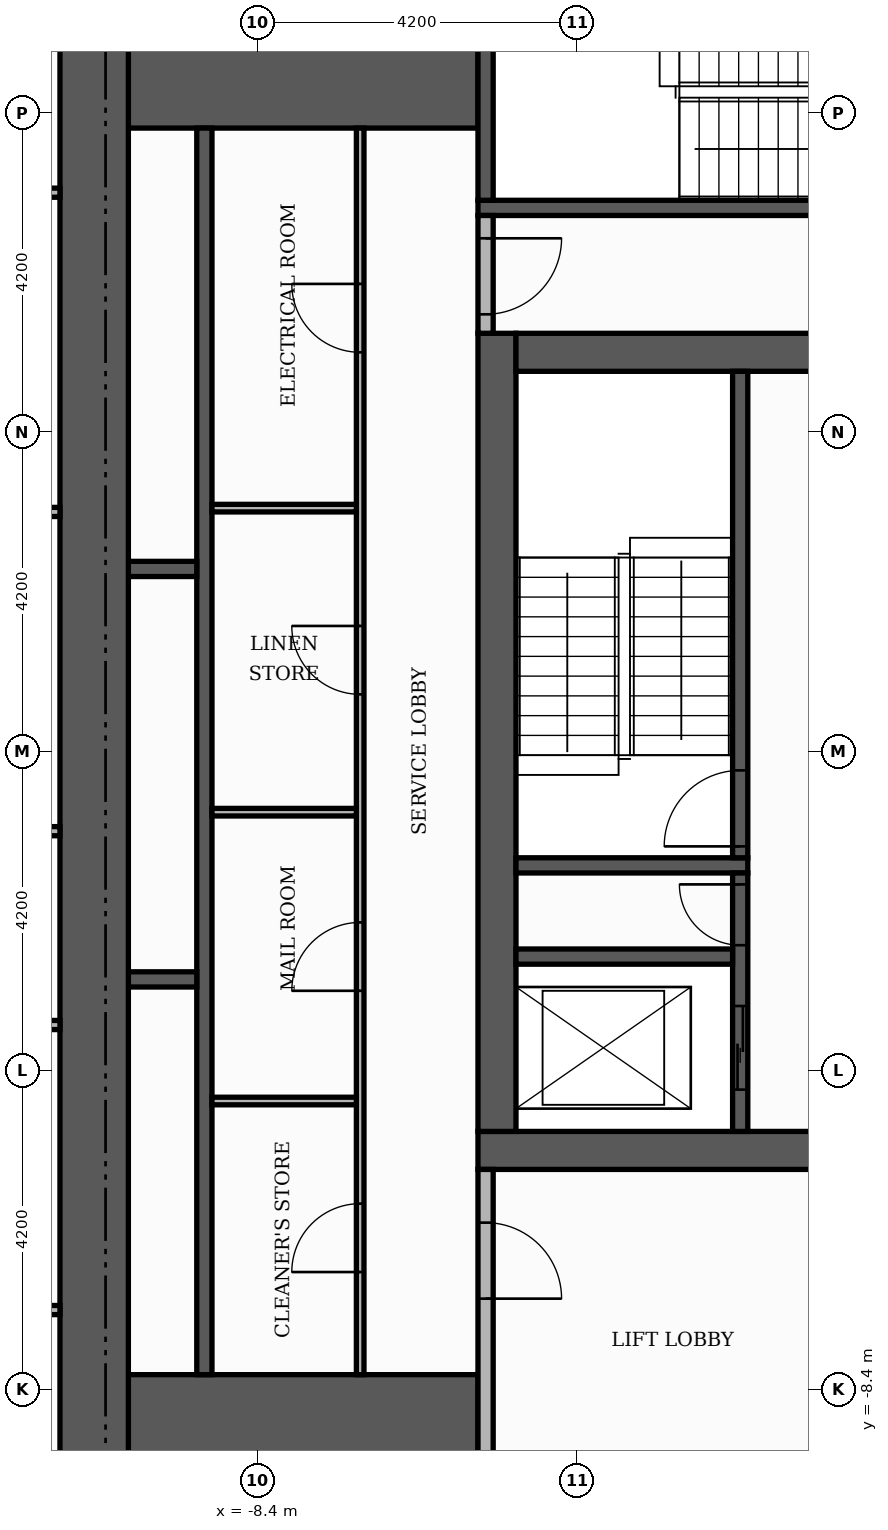
"""IFC4 building model, lengths in metres.
Left out: names, types, materials, properties, quantities, classifications, styles, units other than length and angle.
Written with IfcOpenShell. Run it as: python <this file> out.ifc"""

import sys

from ifc_helpers import new_model, si_unit, direction, frame, frame_2d, origin, place, context, subcontext, project, spatial, rectangle, extrude, element, fill, save


model = new_model("IFC4")
c1 = context("Model", 3, precision=1e-05, world=origin(), true_north=direction((0.0, 1.0)))
c2 = subcontext(c1, "Body", "Model", "MODEL_VIEW")
j1 = project(units=[si_unit("LENGTHUNIT", "METRE"), si_unit("PLANEANGLEUNIT", "RADIAN")], contexts=[c1])
p1 = place(None, origin())
s1 = spatial("IfcSite", under=j1, at=p1, CompositionType="ELEMENT")
p2 = place(p1, origin())
s2 = spatial("IfcBuilding", under=s1, at=p2, CompositionType="ELEMENT")
p3 = place(p2, frame((0.0, 0.0, 252.3)))
s3 = spatial("IfcBuildingStorey", under=s2, at=p3, CompositionType="ELEMENT", Elevation=252.3)
p4 = place(p3, frame((-5.5, -5.25, 0.0), z_axis=(0.0, 0.0, 1.0), x_axis=(1.0, 0.0, 0.0)))
e1 = element("IfcWall", 1, at=p4, inside=s3, PredefinedType="SHEAR", context=c2, shape_type="SweptSolid", body=[
    extrude(rectangle(XDim=11.0, YDim=0.5, at=frame_2d((5.5, 0.0))), origin(), (0.0, 0.0, 1.0), 3.48),
])
p5 = place(p4, frame((4.9, 0.0, 0.0)))
e2 = element("IfcOpeningElement", 2, at=p5, cuts=e1, PredefinedType="OPENING", context=c2, shape_type="SweptSolid", body=[
    extrude(rectangle(XDim=1.2, YDim=2.1, at=frame_2d((0.6, 1.05))), frame((0.0, 0.26, 0.0), z_axis=(0.0, -1.0, 0.0), x_axis=(1.0, 0.0, 0.0)), (0.0, 0.0, 1.0), 0.52),
])
p6 = place(p3, frame((-5.25, -5.0, 0.0), z_axis=(0.0, 0.0, 1.0), x_axis=(0.0, 1.0, 0.0)))
e3 = element("IfcWall", 3, at=p6, inside=s3, PredefinedType="SHEAR", context=c2, shape_type="SweptSolid", body=[
    extrude(rectangle(XDim=10.5, YDim=0.5, at=frame_2d((5.25, 0.0))), origin(), (0.0, 0.0, 1.0), 3.48),
])
p7 = place(p3, frame((-5.0, 5.25, 0.0), z_axis=(0.0, 0.0, 1.0), x_axis=(1.0, 0.0, 0.0)))
e4 = element("IfcWall", 4, at=p7, inside=s3, PredefinedType="SHEAR", context=c2, shape_type="SweptSolid", body=[
    extrude(rectangle(XDim=10.0, YDim=0.5, at=frame_2d((5.0, 0.0))), origin(), (0.0, 0.0, 1.0), 3.48),
])
p8 = place(p7, frame((4.4, 0.0, 0.0)))
e5 = element("IfcOpeningElement", 5, at=p8, cuts=e4, PredefinedType="OPENING", context=c2, shape_type="SweptSolid", body=[
    extrude(rectangle(XDim=1.2, YDim=2.1, at=frame_2d((0.6, 1.05))), frame((0.0, 0.26, 0.0), z_axis=(0.0, -1.0, 0.0), x_axis=(1.0, 0.0, 0.0)), (0.0, 0.0, 1.0), 0.52),
])
for number, where, z_axis, x_axis in (
    (6, (-10.1, -9.15, 0.0), (0.0, 0.0, 1.0), (1.0, 0.0, 0.0)),
    (7, (-10.1, 9.15, 0.0), (0.0, 0.0, 1.0), (1.0, 0.0, 0.0)),
):
    element("IfcWall", number, at=place(p3, frame(where, z_axis=z_axis, x_axis=x_axis)), inside=s3, PredefinedType="SHEAR", context=c2, shape_type="SweptSolid", body=[
        extrude(rectangle(XDim=4.6, YDim=1.9, at=frame_2d((2.3, 0.0))), origin(), (0.0, 0.0, 1.0), 3.48),
    ])
p9 = place(p3, frame((-5.0, -1.5, 0.0), z_axis=(0.0, 0.0, 1.0), x_axis=(1.0, 0.0, 0.0)))
e8 = element("IfcWall", 8, at=p9, inside=s3, PredefinedType="SHEAR", context=c2, shape_type="SweptSolid", body=[
    extrude(rectangle(XDim=3.05, YDim=0.2, at=frame_2d((1.525, 0.0))), origin(), (0.0, 0.0, 1.0), 3.48),
])
p10 = place(p3, frame((-2.05, -1.4, 0.0), z_axis=(0.0, 0.0, 1.0), x_axis=(0.0, 1.0, 0.0)))
e9 = element("IfcWall", 9, at=p10, inside=s3, PredefinedType="SHEAR", context=c2, shape_type="SweptSolid", body=[
    extrude(rectangle(XDim=6.4, YDim=0.2, at=frame_2d((3.2, 0.0))), origin(), (0.0, 0.0, 1.0), 3.48),
])
p11 = place(p10, frame((0.15, 0.0, 0.0)))
e10 = element("IfcOpeningElement", 10, at=p11, cuts=e9, PredefinedType="OPENING", context=c2, shape_type="SweptSolid", body=[
    extrude(rectangle(XDim=1.0, YDim=2.1, at=frame_2d((0.5, 1.05))), frame((0.0, 0.11, 0.0), z_axis=(0.0, -1.0, 0.0), x_axis=(1.0, 0.0, 0.0)), (0.0, 0.0, 1.0), 0.22),
])
p12 = place(p3, frame((-5.5, 7.15, 0.0), z_axis=(0.0, 0.0, 1.0), x_axis=(1.0, 0.0, 0.0)))
e11 = element("IfcWall", 11, at=p12, inside=s3, PredefinedType="SHEAR", context=c2, shape_type="SweptSolid", body=[
    extrude(rectangle(XDim=6.8, YDim=0.2, at=frame_2d((3.4, 0.0))), origin(), (0.0, 0.0, 1.0), 3.48),
])
p13 = place(p3, frame((-5.4, 7.25, 0.0), z_axis=(0.0, 0.0, 1.0), x_axis=(0.0, 1.0, 0.0)))
e12 = element("IfcWall", 12, at=p13, inside=s3, PredefinedType="SHEAR", context=c2, shape_type="SweptSolid", body=[
    extrude(rectangle(XDim=2.85, YDim=0.2, at=frame_2d((1.425, 0.0))), origin(), (0.0, 0.0, 1.0), 3.48),
])
p14 = place(p3, frame((-9.1, -8.2, 0.0), z_axis=(0.0, 0.0, 1.0), x_axis=(0.0, 1.0, 0.0)))
e13 = element("IfcWall", 13, at=p14, inside=s3, PredefinedType="SHEAR", context=c2, shape_type="SweptSolid", body=[
    extrude(rectangle(XDim=16.4, YDim=0.2, at=frame_2d((8.2, 0.0))), origin(), (0.0, 0.0, 1.0), 3.48),
])
p15 = place(p3, frame((-2.05, -5.0, 0.0), z_axis=(0.0, 0.0, 1.0), x_axis=(0.0, 1.0, 0.0)))
e14 = element("IfcWall", 14, at=p15, inside=s3, PredefinedType="SHEAR", context=c2, shape_type="SweptSolid", body=[
    extrude(rectangle(XDim=3.4, YDim=0.2, at=frame_2d((1.7, 0.0))), origin(), (0.0, 0.0, 1.0), 3.48),
])
p16 = place(p15, frame((0.55, 0.0, 0.0)))
e15 = element("IfcOpeningElement", 15, at=p16, cuts=e14, PredefinedType="OPENING", context=c2, shape_type="SweptSolid", body=[
    extrude(rectangle(XDim=1.1, YDim=2.1, at=frame_2d((0.55, 1.05))), frame((0.0, 0.11, 0.0), z_axis=(0.0, -1.0, 0.0), x_axis=(1.0, 0.0, 0.0)), (0.0, 0.0, 1.0), 0.22),
])
p17 = place(p15, frame((2.45, 0.0, 0.0)))
e16 = element("IfcOpeningElement", 16, at=p17, cuts=e14, PredefinedType="OPENING", context=c2, shape_type="SweptSolid", body=[
    extrude(rectangle(XDim=0.8, YDim=2.1, at=frame_2d((0.4, 1.05))), frame((0.0, 0.11, 0.0), z_axis=(0.0, -1.0, 0.0), x_axis=(1.0, 0.0, 0.0)), (0.0, 0.0, 1.0), 0.22),
])
p18 = place(p3, frame((-10.1, -3.0, 0.0), z_axis=(0.0, 0.0, 1.0), x_axis=(1.0, 0.0, 0.0)))
e17 = element("IfcWall", 17, at=p18, inside=s3, PredefinedType="SHEAR", context=c2, shape_type="SweptSolid", body=[
    extrude(rectangle(XDim=0.9, YDim=0.2, at=frame_2d((0.45, 0.0))), origin(), (0.0, 0.0, 1.0), 3.48),
])
p19 = place(p3, frame((-5.0, -2.7, 0.0), z_axis=(0.0, 0.0, 1.0), x_axis=(1.0, 0.0, 0.0)))
e18 = element("IfcWall", 18, at=p19, inside=s3, PredefinedType="SHEAR", context=c2, shape_type="SweptSolid", body=[
    extrude(rectangle(XDim=2.85, YDim=0.2, at=frame_2d((1.425, 0.0))), origin(), (0.0, 0.0, 1.0), 3.48),
])
p20 = place(p3, frame((-10.1, 2.4, 0.0), z_axis=(0.0, 0.0, 1.0), x_axis=(1.0, 0.0, 0.0)))
e19 = element("IfcWall", 19, at=p20, inside=s3, PredefinedType="SHEAR", context=c2, shape_type="SweptSolid", body=[
    extrude(rectangle(XDim=0.9, YDim=0.2, at=frame_2d((0.45, 0.0))), origin(), (0.0, 0.0, 1.0), 3.48),
])
p21 = place(p3, frame((-10.55, -10.1, 0.0), z_axis=(0.0, 0.0, 1.0), x_axis=(0.0, 1.0, 0.0)))
e20 = element("IfcWall", 20, at=p21, inside=s3, PredefinedType="SHEAR", context=c2, shape_type="SweptSolid", body=[
    extrude(rectangle(XDim=20.2, YDim=0.9, at=frame_2d((10.1, 0.0))), origin(), (0.0, 0.0, 1.0), 3.48),
])
p22 = place(p3, frame((-5.4, -10.1, 0.0), z_axis=(0.0, 0.0, 1.0), x_axis=(0.0, 1.0, 0.0)))
e21 = element("IfcWall", 21, at=p22, inside=s3, PredefinedType="PARTITIONING", context=c2, shape_type="SweptSolid", body=[
    extrude(rectangle(XDim=4.6, YDim=0.2, at=frame_2d((2.3, 0.0))), origin(), (0.0, 0.0, 1.0), 3.48),
])
p23 = place(p22, frame((2.9, 0.0, 0.0)))
e22 = element("IfcOpeningElement", 22, at=p23, cuts=e21, PredefinedType="OPENING", context=c2, shape_type="SweptSolid", body=[
    extrude(rectangle(XDim=1.0, YDim=2.1, at=frame_2d((0.5, 1.05))), frame((0.0, 0.11, 0.0), z_axis=(0.0, -1.0, 0.0), x_axis=(1.0, 0.0, 0.0)), (0.0, 0.0, 1.0), 0.22),
])
p24 = place(p3, frame((-7.05, -8.2, 0.0), z_axis=(0.0, 0.0, 1.0), x_axis=(0.0, 1.0, 0.0)))
e23 = element("IfcWall", 23, at=p24, inside=s3, PredefinedType="PARTITIONING", context=c2, shape_type="SweptSolid", body=[
    extrude(rectangle(XDim=16.4, YDim=0.1, at=frame_2d((8.2, 0.0))), origin(), (0.0, 0.0, 1.0), 3.48),
])
p25 = place(p24, frame((1.35, 0.0, 0.0)))
e24 = element("IfcOpeningElement", 24, at=p25, cuts=e23, PredefinedType="OPENING", context=c2, shape_type="SweptSolid", body=[
    extrude(rectangle(XDim=0.9, YDim=2.1, at=frame_2d((0.45, 1.05))), frame((0.0, 0.06, 0.0), z_axis=(0.0, -1.0, 0.0), x_axis=(1.0, 0.0, 0.0)), (0.0, 0.0, 1.0), 0.12),
])
p26 = place(p24, frame((5.05, 0.0, 0.0)))
e25 = element("IfcOpeningElement", 25, at=p26, cuts=e23, PredefinedType="OPENING", context=c2, shape_type="SweptSolid", body=[
    extrude(rectangle(XDim=0.9, YDim=2.1, at=frame_2d((0.45, 1.05))), frame((0.0, 0.06, 0.0), z_axis=(0.0, -1.0, 0.0), x_axis=(1.0, 0.0, 0.0)), (0.0, 0.0, 1.0), 0.12),
])
p27 = place(p24, frame((8.95, 0.0, 0.0)))
e26 = element("IfcOpeningElement", 26, at=p27, cuts=e23, PredefinedType="OPENING", context=c2, shape_type="SweptSolid", body=[
    extrude(rectangle(XDim=0.9, YDim=2.1, at=frame_2d((0.45, 1.05))), frame((0.0, 0.06, 0.0), z_axis=(0.0, -1.0, 0.0), x_axis=(1.0, 0.0, 0.0)), (0.0, 0.0, 1.0), 0.12),
])
p28 = place(p24, frame((13.45, 0.0, 0.0)))
e27 = element("IfcOpeningElement", 27, at=p28, cuts=e23, PredefinedType="OPENING", context=c2, shape_type="SweptSolid", body=[
    extrude(rectangle(XDim=0.9, YDim=2.1, at=frame_2d((0.45, 1.05))), frame((0.0, 0.06, 0.0), z_axis=(0.0, -1.0, 0.0), x_axis=(1.0, 0.0, 0.0)), (0.0, 0.0, 1.0), 0.12),
])
for number, where, z_axis, x_axis in (
    (28, (-9.0, -4.6, 0.0), (0.0, 0.0, 1.0), (1.0, 0.0, 0.0)),
    (29, (-9.0, -0.8, 0.0), (0.0, 0.0, 1.0), (1.0, 0.0, 0.0)),
    (30, (-9.0, 3.2, 0.0), (0.0, 0.0, 1.0), (1.0, 0.0, 0.0)),
):
    element("IfcWall", number, at=place(p3, frame(where, z_axis=z_axis, x_axis=x_axis)), inside=s3, PredefinedType="PARTITIONING", context=c2, shape_type="SweptSolid", body=[
        extrude(rectangle(XDim=1.9, YDim=0.1, at=frame_2d((0.95, 0.0))), origin(), (0.0, 0.0, 1.0), 3.48),
    ])
p29 = place(p3, frame((-5.4, 5.5, 0.0), z_axis=(0.0, 0.0, 1.0), x_axis=(0.0, 1.0, 0.0)))
e31 = element("IfcWall", 31, at=p29, inside=s3, PredefinedType="PARTITIONING", context=c2, shape_type="SweptSolid", body=[
    extrude(rectangle(XDim=1.55, YDim=0.2, at=frame_2d((0.775, 0.0))), origin(), (0.0, 0.0, 1.0), 3.48),
])
p30 = place(p29, frame((0.25, 0.0, 0.0)))
e32 = element("IfcOpeningElement", 32, at=p30, cuts=e31, PredefinedType="OPENING", context=c2, shape_type="SweptSolid", body=[
    extrude(rectangle(XDim=1.0, YDim=2.1, at=frame_2d((0.5, 1.05))), frame((0.0, 0.11, 0.0), z_axis=(0.0, -1.0, 0.0), x_axis=(1.0, 0.0, 0.0)), (0.0, 0.0, 1.0), 0.22),
])
for number, where, z_axis, x_axis in (
    (33, (-18.62, -7.35, 0.0), (0.0, 0.0, 1.0), (1.0, 0.0, 0.0)),
    (34, (-18.62, -3.6, 0.0), (0.0, 0.0, 1.0), (1.0, 0.0, 0.0)),
    (35, (-18.62, -1.05, 0.0), (0.0, 0.0, 1.0), (1.0, 0.0, 0.0)),
    (36, (-18.62, 3.15, 0.0), (0.0, 0.0, 1.0), (1.0, 0.0, 0.0)),
):
    element("IfcWall", number, at=place(p3, frame(where, z_axis=z_axis, x_axis=x_axis)), inside=s3, PredefinedType="PARTITIONING", context=c2, shape_type="SweptSolid", body=[
        extrude(rectangle(XDim=7.62, YDim=0.12, at=frame_2d((3.81, 0.0))), origin(), (0.0, 0.0, 1.0), 3.48),
    ])
p31 = place(p3, frame((-18.62, 7.35, 0.0), z_axis=(0.0, 0.0, 1.0), x_axis=(1.0, 0.0, 0.0)))
e37 = element("IfcWall", 37, at=p31, inside=s3, PredefinedType="PARTITIONING", context=c2, shape_type="SweptSolid", body=[
    extrude(rectangle(XDim=7.62, YDim=0.12, at=frame_2d((3.81, 0.0))), origin(), (0.0, 0.0, 1.0), 3.48),
])
p32 = place(p31, frame((3.36, 0.0, 0.0)))
e38 = element("IfcOpeningElement", 38, at=p32, cuts=e37, PredefinedType="OPENING", context=c2, shape_type="SweptSolid", body=[
    extrude(rectangle(XDim=0.9, YDim=2.1, at=frame_2d((0.45, 1.05))), frame((0.0, 0.07, 0.0), z_axis=(0.0, -1.0, 0.0), x_axis=(1.0, 0.0, 0.0)), (0.0, 0.0, 1.0), 0.14),
])
p33 = place(p16, origin())
e39 = element("IfcDoor", 39, at=p33, inside=s3, OperationType="SLIDING_TO_LEFT", PredefinedType="DOOR", context=c2, shape_type="SweptSolid", body=[
    extrude(rectangle(XDim=1.1, YDim=2.1, at=frame_2d((0.55, 1.05))), frame((0.0, 0.025, 0.0), z_axis=(0.0, -1.0, 0.0), x_axis=(1.0, 0.0, 0.0)), (0.0, 0.0, 1.0), 0.05),
])
fill(e15, e39)
p34 = place(p11, origin())
e40 = element("IfcDoor", 40, at=p34, inside=s3, OperationType="SINGLE_SWING_LEFT", PredefinedType="DOOR", context=c2, shape_type="SweptSolid", body=[
    extrude(rectangle(XDim=1.0, YDim=2.1, at=frame_2d((0.5, 1.05))), frame((0.0, 0.025, 0.0), z_axis=(0.0, -1.0, 0.0), x_axis=(1.0, 0.0, 0.0)), (0.0, 0.0, 1.0), 0.05),
])
fill(e10, e40)
p35 = place(p17, origin())
e41 = element("IfcDoor", 41, at=p35, inside=s3, OperationType="SINGLE_SWING_RIGHT", PredefinedType="DOOR", context=c2, shape_type="SweptSolid", body=[
    extrude(rectangle(XDim=0.8, YDim=2.1, at=frame_2d((0.4, 1.05))), frame((0.0, 0.025, 0.0), z_axis=(0.0, -1.0, 0.0), x_axis=(1.0, 0.0, 0.0)), (0.0, 0.0, 1.0), 0.05),
])
fill(e16, e41)
p36 = place(p30, frame((1.0, 0.0, 0.0), z_axis=(0.0, 0.0, 1.0), x_axis=(-1.0, 0.0, 0.0)))
e42 = element("IfcDoor", 42, at=p36, inside=s3, OperationType="SINGLE_SWING_RIGHT", PredefinedType="DOOR", context=c2, shape_type="SweptSolid", body=[
    extrude(rectangle(XDim=1.0, YDim=2.1, at=frame_2d((0.5, 1.05))), frame((0.0, 0.025, 0.0), z_axis=(0.0, -1.0, 0.0), x_axis=(1.0, 0.0, 0.0)), (0.0, 0.0, 1.0), 0.05),
])
fill(e32, e42)
p37 = place(p23, frame((1.0, 0.0, 0.0), z_axis=(0.0, 0.0, 1.0), x_axis=(-1.0, 0.0, 0.0)))
e43 = element("IfcDoor", 43, at=p37, inside=s3, OperationType="SINGLE_SWING_LEFT", PredefinedType="DOOR", context=c2, shape_type="SweptSolid", body=[
    extrude(rectangle(XDim=1.0, YDim=2.1, at=frame_2d((0.5, 1.05))), frame((0.0, 0.025, 0.0), z_axis=(0.0, -1.0, 0.0), x_axis=(1.0, 0.0, 0.0)), (0.0, 0.0, 1.0), 0.05),
])
fill(e22, e43)
p38 = place(p25, origin())
e44 = element("IfcDoor", 44, at=p38, inside=s3, OperationType="SINGLE_SWING_LEFT", PredefinedType="DOOR", context=c2, shape_type="SweptSolid", body=[
    extrude(rectangle(XDim=0.9, YDim=2.1, at=frame_2d((0.45, 1.05))), frame((0.0, 0.025, 0.0), z_axis=(0.0, -1.0, 0.0), x_axis=(1.0, 0.0, 0.0)), (0.0, 0.0, 1.0), 0.05),
])
fill(e24, e44)
p39 = place(p26, origin())
e45 = element("IfcDoor", 45, at=p39, inside=s3, OperationType="SINGLE_SWING_LEFT", PredefinedType="DOOR", context=c2, shape_type="SweptSolid", body=[
    extrude(rectangle(XDim=0.9, YDim=2.1, at=frame_2d((0.45, 1.05))), frame((0.0, 0.025, 0.0), z_axis=(0.0, -1.0, 0.0), x_axis=(1.0, 0.0, 0.0)), (0.0, 0.0, 1.0), 0.05),
])
fill(e25, e45)
p40 = place(p27, origin())
e46 = element("IfcDoor", 46, at=p40, inside=s3, OperationType="SINGLE_SWING_RIGHT", PredefinedType="DOOR", context=c2, shape_type="SweptSolid", body=[
    extrude(rectangle(XDim=0.9, YDim=2.1, at=frame_2d((0.45, 1.05))), frame((0.0, 0.025, 0.0), z_axis=(0.0, -1.0, 0.0), x_axis=(1.0, 0.0, 0.0)), (0.0, 0.0, 1.0), 0.05),
])
fill(e26, e46)
p41 = place(p28, origin())
e47 = element("IfcDoor", 47, at=p41, inside=s3, OperationType="SINGLE_SWING_RIGHT", PredefinedType="DOOR", context=c2, shape_type="SweptSolid", body=[
    extrude(rectangle(XDim=0.9, YDim=2.1, at=frame_2d((0.45, 1.05))), frame((0.0, 0.025, 0.0), z_axis=(0.0, -1.0, 0.0), x_axis=(1.0, 0.0, 0.0)), (0.0, 0.0, 1.0), 0.05),
])
fill(e27, e47)
save(model, sys.argv[1])
